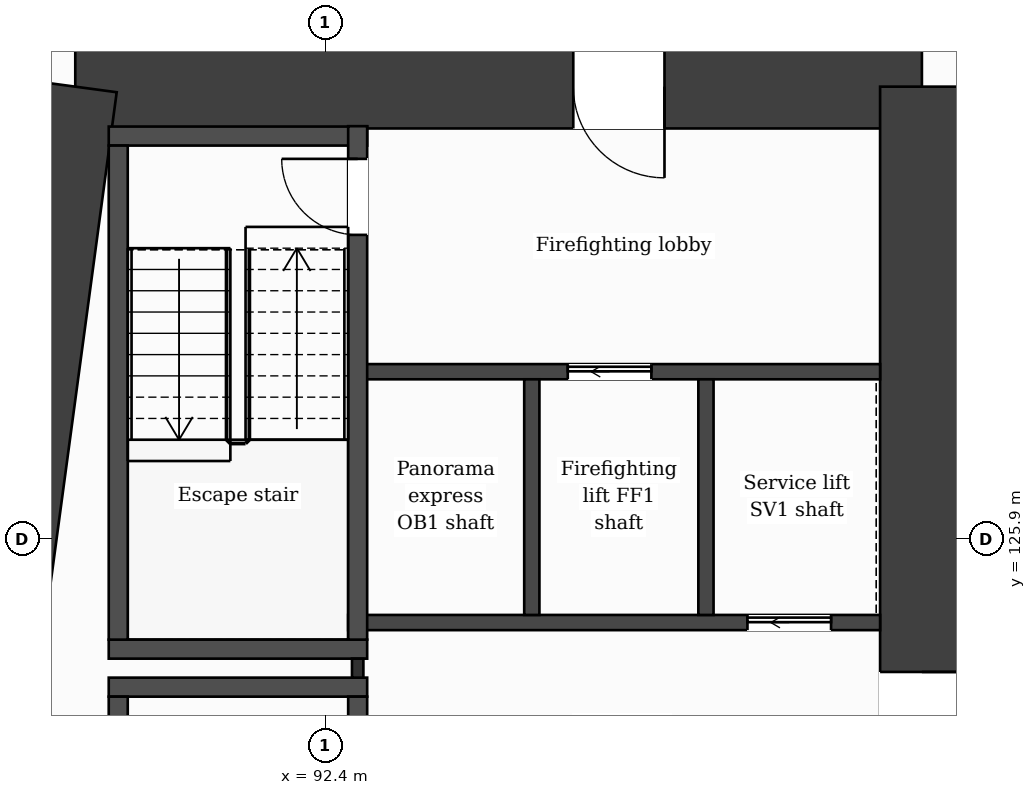
"""IFC4 building model, lengths in metres.
Left out: names, types, materials, properties, quantities, classifications, styles, units other than length and angle.
Written with IfcOpenShell. Run it as: python <this file> out.ifc"""

import sys

from ifc_helpers import new_model, si_unit, direction, frame, frame_2d, origin, place, context, subcontext, project, spatial, rectangle, extrude, element, fill, save


model = new_model("IFC4")
c1 = context("Model", 3, precision=1e-05, world=origin(), true_north=direction((0.0, 1.0)))
c2 = subcontext(c1, "Body", "Model", "MODEL_VIEW")
j1 = project(units=[si_unit("LENGTHUNIT", "METRE"), si_unit("PLANEANGLEUNIT", "RADIAN")], contexts=[c1])
p1 = place(None, origin())
s1 = spatial("IfcSite", under=j1, at=p1, CompositionType="ELEMENT")
p2 = place(p1, origin())
s2 = spatial("IfcBuilding", under=s1, at=p2, CompositionType="ELEMENT")
p3 = place(p2, frame((0.0, 0.0, 39.0)))
s3 = spatial("IfcBuildingStorey", under=s2, at=p3, CompositionType="ELEMENT", Elevation=39.0)
p4 = place(p3, frame((89.112, 131.85, 0.0), z_axis=(0.0, 0.0, 1.0), x_axis=(1.0, 0.0, 0.0)))
e1 = element("IfcWall", 1, at=p4, inside=s3, PredefinedType="SHEAR", context=c2, shape_type="SweptSolid", body=[
    extrude(rectangle(XDim=11.138, YDim=1.1, at=frame_2d((5.569, 0.0))), origin(), (0.0, 0.0, 1.0), 3.5),
])
p5 = place(p4, frame((6.552, 0.0, 0.0)))
e2 = element("IfcOpeningElement", 2, at=p5, cuts=e1, PredefinedType="OPENING", context=c2, shape_type="SweptSolid", body=[
    extrude(rectangle(XDim=1.2, YDim=2.1, at=frame_2d((0.6, 1.05))), frame((0.0, 0.56, 0.0), z_axis=(0.0, -1.0, 0.0), x_axis=(1.0, 0.0, 0.0)), (0.0, 0.0, 1.0), 1.12),
])
p6 = place(p3, frame((100.25, 131.85, 0.0), z_axis=(0.0, 0.0, 1.0), x_axis=(0.0, -1.0, 0.0)))
e3 = element("IfcWall", 3, at=p6, inside=s3, PredefinedType="SHEAR", context=c2, shape_type="SweptSolid", body=[
    extrude(rectangle(XDim=20.9, YDim=1.1, at=frame_2d((10.45, 0.0))), origin(), (0.0, 0.0, 1.0), 3.5),
])
p7 = place(p6, frame((7.7, 0.0, 0.0)))
e4 = element("IfcOpeningElement", 4, at=p7, cuts=e3, PredefinedType="OPENING", context=c2, shape_type="SweptSolid", body=[
    extrude(rectangle(XDim=1.4, YDim=2.1, at=frame_2d((0.7, 1.05))), frame((0.0, 0.56, 0.0), z_axis=(0.0, -1.0, 0.0), x_axis=(1.0, 0.0, 0.0)), (0.0, 0.0, 1.0), 1.12),
])
p8 = place(p3, frame((86.298, 110.95, 0.0), z_axis=(0.0, 0.0, 1.0), x_axis=(0.133400422634, 0.99106222168, 0.0)))
e5 = element("IfcWall", 5, at=p8, inside=s3, PredefinedType="SHEAR", context=c2, shape_type="SweptSolid", body=[
    extrude(rectangle(XDim=21.089, YDim=1.1, at=frame_2d((10.544, 0.0))), origin(), (0.0, 0.0, 1.0), 3.5),
])
for number, where, z_axis, x_axis in (
    (6, (89.552, 123.95, 0.0), (0.0, 0.0, 1.0), (1.0, 0.0, 0.0)),
    (7, (89.552, 124.45, 0.0), (0.0, 0.0, 1.0), (1.0, 0.0, 0.0)),
):
    element("IfcWall", number, at=place(p3, frame(where, z_axis=z_axis, x_axis=x_axis)), inside=s3, PredefinedType="PARTITIONING", context=c2, shape_type="SweptSolid", body=[
        extrude(rectangle(XDim=3.4, YDim=0.25, at=frame_2d((1.7, 0.0))), origin(), (0.0, 0.0, 1.0), 3.18),
    ])
p9 = place(p3, frame((92.702, 124.8, 0.0), z_axis=(0.0, 0.0, 1.0), x_axis=(1.0, 0.0, 0.0)))
e8 = element("IfcWall", 8, at=p9, inside=s3, PredefinedType="PARTITIONING", context=c2, shape_type="SweptSolid", body=[
    extrude(rectangle(XDim=6.998, YDim=0.2, at=frame_2d((3.499, 0.0))), origin(), (0.0, 0.0, 1.0), 3.18),
])
p10 = place(p9, frame((5.253, 0.0, 0.0)))
e9 = element("IfcOpeningElement", 9, at=p10, cuts=e8, PredefinedType="OPENING", context=c2, shape_type="SweptSolid", body=[
    extrude(rectangle(XDim=1.1, YDim=2.1, at=frame_2d((0.55, 1.05))), frame((0.0, 0.11, 0.0), z_axis=(0.0, -1.0, 0.0), x_axis=(1.0, 0.0, 0.0)), (0.0, 0.0, 1.0), 0.22),
])
p11 = place(p3, frame((92.827, 128.1, 0.0), z_axis=(0.0, 0.0, 1.0), x_axis=(1.0, 0.0, 0.0)))
e10 = element("IfcWall", 10, at=p11, inside=s3, PredefinedType="PARTITIONING", context=c2, shape_type="SweptSolid", body=[
    extrude(rectangle(XDim=6.873, YDim=0.2, at=frame_2d((3.437, 0.0))), origin(), (0.0, 0.0, 1.0), 3.18),
])
p12 = place(p11, frame((2.764, 0.0, 0.0)))
e11 = element("IfcOpeningElement", 11, at=p12, cuts=e10, PredefinedType="OPENING", context=c2, shape_type="SweptSolid", body=[
    extrude(rectangle(XDim=1.1, YDim=2.1, at=frame_2d((0.55, 1.05))), frame((0.0, 0.11, 0.0), z_axis=(0.0, -1.0, 0.0), x_axis=(1.0, 0.0, 0.0)), (0.0, 0.0, 1.0), 0.22),
])
p13 = place(p3, frame((89.552, 131.2, 0.0), z_axis=(0.0, 0.0, 1.0), x_axis=(1.0, 0.0, 0.0)))
e12 = element("IfcWall", 12, at=p13, inside=s3, PredefinedType="PARTITIONING", context=c2, shape_type="SweptSolid", body=[
    extrude(rectangle(XDim=3.4, YDim=0.25, at=frame_2d((1.7, 0.0))), origin(), (0.0, 0.0, 1.0), 3.18),
])
p14 = place(p3, frame((89.677, 117.07, 0.0), z_axis=(0.0, 0.0, 1.0), x_axis=(0.0, 1.0, 0.0)))
e13 = element("IfcWall", 13, at=p14, inside=s3, PredefinedType="PARTITIONING", context=c2, shape_type="SweptSolid", body=[
    extrude(rectangle(XDim=6.755, YDim=0.25, at=frame_2d((3.377, 0.0))), origin(), (0.0, 0.0, 1.0), 3.18),
])
p15 = place(p3, frame((89.677, 124.575, 0.0), z_axis=(0.0, 0.0, 1.0), x_axis=(0.0, 1.0, 0.0)))
e14 = element("IfcWall", 14, at=p15, inside=s3, PredefinedType="PARTITIONING", context=c2, shape_type="SweptSolid", body=[
    extrude(rectangle(XDim=6.5, YDim=0.25, at=frame_2d((3.25, 0.0))), origin(), (0.0, 0.0, 1.0), 3.18),
])
p16 = place(p3, frame((92.827, 124.075, 0.0), z_axis=(0.0, 0.0, 1.0), x_axis=(0.0, 1.0, 0.0)))
e15 = element("IfcWall", 15, at=p16, inside=s3, PredefinedType="PARTITIONING", context=c2, shape_type="SweptSolid", body=[
    extrude(rectangle(XDim=0.25, YDim=0.15, at=frame_2d((0.125, 0.0))), origin(), (0.0, 0.0, 1.0), 3.18),
])
p17 = place(p3, frame((92.827, 117.07, 0.0), z_axis=(0.0, 0.0, 1.0), x_axis=(0.0, 1.0, 0.0)))
e16 = element("IfcWall", 16, at=p17, inside=s3, PredefinedType="PARTITIONING", context=c2, shape_type="SweptSolid", body=[
    extrude(rectangle(XDim=6.755, YDim=0.25, at=frame_2d((3.377, 0.0))), origin(), (0.0, 0.0, 1.0), 3.18),
])
p18 = place(p17, frame((5.455, 0.0, 0.0)))
e17 = element("IfcOpeningElement", 17, at=p18, cuts=e16, PredefinedType="OPENING", context=c2, shape_type="SweptSolid", body=[
    extrude(rectangle(XDim=0.95, YDim=2.1, at=frame_2d((0.475, 1.05))), frame((0.0, 0.135, 0.0), z_axis=(0.0, -1.0, 0.0), x_axis=(1.0, 0.0, 0.0)), (0.0, 0.0, 1.0), 0.27),
])
p19 = place(p3, frame((92.827, 124.575, 0.0), z_axis=(0.0, 0.0, 1.0), x_axis=(0.0, 1.0, 0.0)))
e18 = element("IfcWall", 18, at=p19, inside=s3, PredefinedType="PARTITIONING", context=c2, shape_type="SweptSolid", body=[
    extrude(rectangle(XDim=6.755, YDim=0.25, at=frame_2d((3.377, 0.0))), origin(), (0.0, 0.0, 1.0), 3.18),
])
p20 = place(p19, frame((5.325, 0.0, 0.0)))
e19 = element("IfcOpeningElement", 19, at=p20, cuts=e18, PredefinedType="OPENING", context=c2, shape_type="SweptSolid", body=[
    extrude(rectangle(XDim=1.0, YDim=2.1, at=frame_2d((0.5, 1.05))), frame((0.0, 0.135, 0.0), z_axis=(0.0, -1.0, 0.0), x_axis=(1.0, 0.0, 0.0)), (0.0, 0.0, 1.0), 0.27),
])
for number, where, z_axis, x_axis in (
    (20, (95.118, 124.9, 0.0), (0.0, 0.0, 1.0), (0.0, 1.0, 0.0)),
    (21, (97.409, 124.9, 0.0), (0.0, 0.0, 1.0), (0.0, 1.0, 0.0)),
):
    element("IfcWall", number, at=place(p3, frame(where, z_axis=z_axis, x_axis=x_axis)), inside=s3, PredefinedType="PARTITIONING", context=c2, shape_type="SweptSolid", body=[
        extrude(rectangle(XDim=3.1, YDim=0.2, at=frame_2d((1.55, 0.0))), origin(), (0.0, 0.0, 1.0), 3.18),
    ])
p21 = place(p12, origin())
e22 = element("IfcDoor", 22, at=p21, inside=s3, OperationType="SLIDING_TO_LEFT", PredefinedType="DOOR", context=c2, shape_type="SweptSolid", body=[
    extrude(rectangle(XDim=1.1, YDim=2.1, at=frame_2d((0.55, 1.05))), frame((0.0, 0.025, 0.0), z_axis=(0.0, -1.0, 0.0), x_axis=(1.0, 0.0, 0.0)), (0.0, 0.0, 1.0), 0.05),
])
fill(e11, e22)
p22 = place(p10, origin())
e23 = element("IfcDoor", 23, at=p22, inside=s3, OperationType="SLIDING_TO_LEFT", PredefinedType="DOOR", context=c2, shape_type="SweptSolid", body=[
    extrude(rectangle(XDim=1.1, YDim=2.1, at=frame_2d((0.55, 1.05))), frame((0.0, 0.025, 0.0), z_axis=(0.0, -1.0, 0.0), x_axis=(1.0, 0.0, 0.0)), (0.0, 0.0, 1.0), 0.05),
])
fill(e9, e23)
p23 = place(p20, origin())
e24 = element("IfcDoor", 24, at=p23, inside=s3, OperationType="SINGLE_SWING_RIGHT", PredefinedType="DOOR", context=c2, shape_type="SweptSolid", body=[
    extrude(rectangle(XDim=1.0, YDim=2.1, at=frame_2d((0.5, 1.05))), frame((0.0, 0.025, 0.0), z_axis=(0.0, -1.0, 0.0), x_axis=(1.0, 0.0, 0.0)), (0.0, 0.0, 1.0), 0.05),
])
fill(e19, e24)
p24 = place(p5, origin())
e25 = element("IfcDoor", 25, at=p24, inside=s3, OperationType="SINGLE_SWING_RIGHT", PredefinedType="DOOR", context=c2, shape_type="SweptSolid", body=[
    extrude(rectangle(XDim=1.2, YDim=2.1, at=frame_2d((0.6, 1.05))), frame((0.0, 0.025, 0.0), z_axis=(0.0, -1.0, 0.0), x_axis=(1.0, 0.0, 0.0)), (0.0, 0.0, 1.0), 0.05),
])
fill(e2, e25)
p25 = place(p7, origin())
e26 = element("IfcDoor", 26, at=p25, inside=s3, OperationType="SINGLE_SWING_LEFT", PredefinedType="DOOR", context=c2, shape_type="SweptSolid", body=[
    extrude(rectangle(XDim=1.4, YDim=2.1, at=frame_2d((0.7, 1.05))), frame((0.0, 0.025, 0.0), z_axis=(0.0, -1.0, 0.0), x_axis=(1.0, 0.0, 0.0)), (0.0, 0.0, 1.0), 0.05),
])
fill(e4, e26)
save(model, sys.argv[1])
